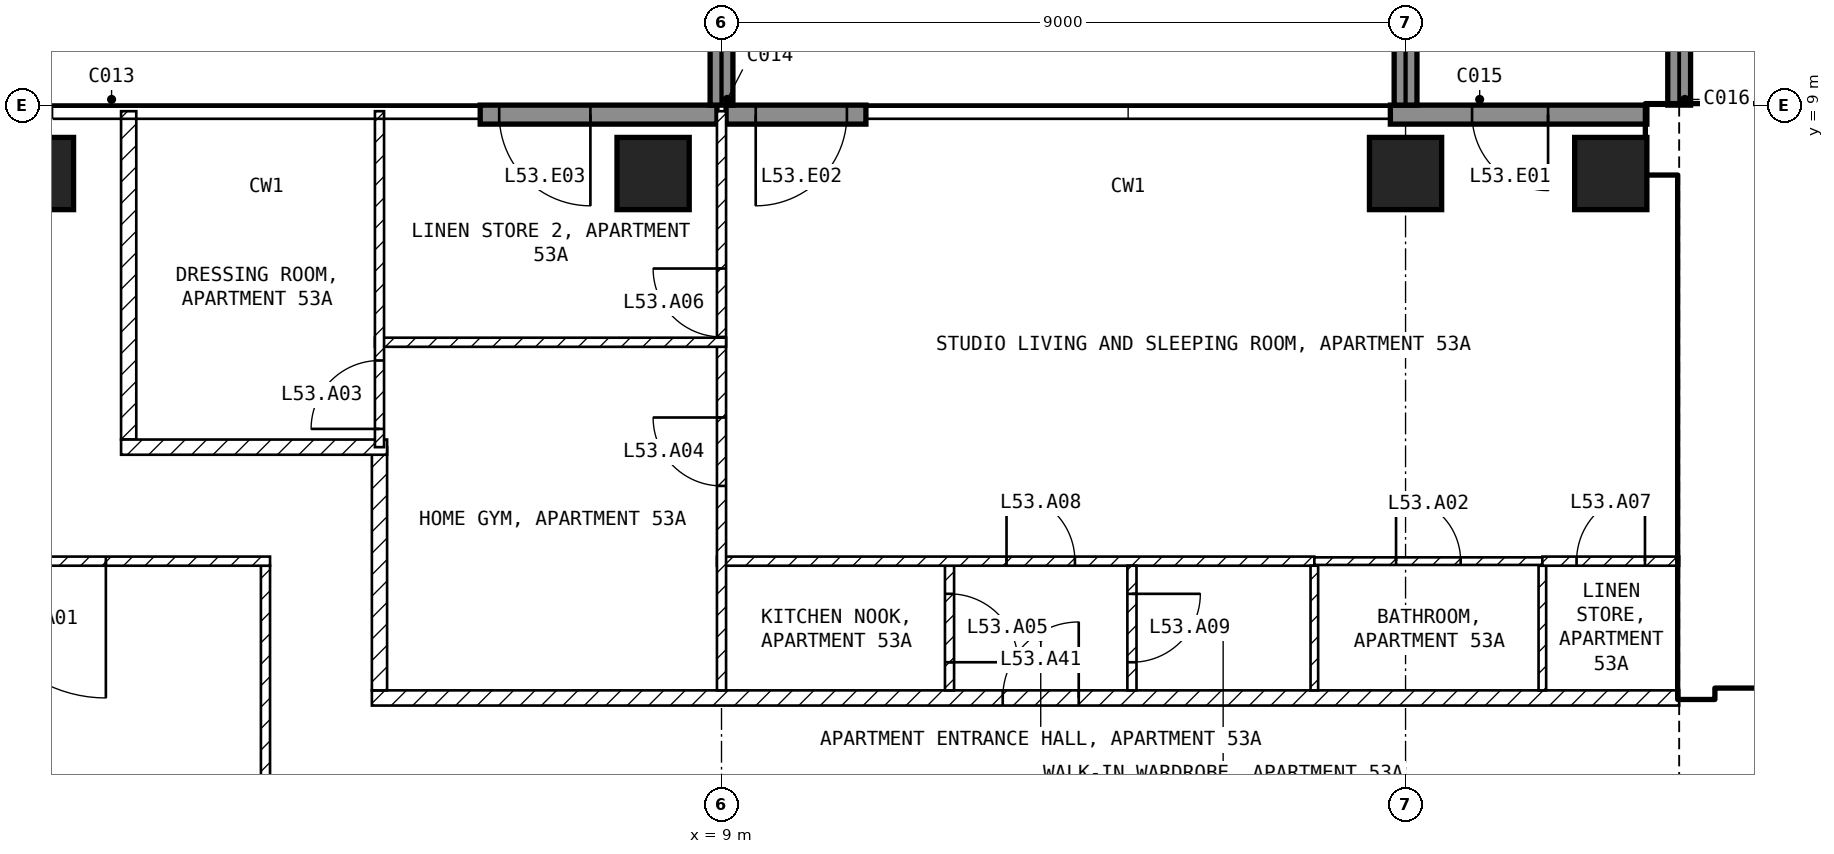
"""IFC4 building model, lengths in metres.
Left out: names, types, materials, properties, quantities, classifications, styles, units other than length and angle.
Written with IfcOpenShell. Run it as: python <this file> out.ifc"""

import sys

from ifc_helpers import new_model, si_unit, direction, frame, frame_2d, origin, origin_2d, place, context, subcontext, project, spatial, rectangle, extrude, element, fill, save


model = new_model("IFC4")
c1 = context("Model", 3, precision=1e-05, world=origin(), true_north=direction((0.0, 1.0)))
c2 = subcontext(c1, "Body", "Model", "MODEL_VIEW")
j1 = project(units=[si_unit("LENGTHUNIT", "METRE"), si_unit("PLANEANGLEUNIT", "RADIAN")], contexts=[c1])
p1 = place(None, origin())
s1 = spatial("IfcSite", under=j1, at=p1, CompositionType="ELEMENT")
p2 = place(p1, origin())
s2 = spatial("IfcBuilding", under=s1, at=p2, CompositionType="ELEMENT")
p3 = place(p2, frame((0.0, 0.0, 212.1)))
s3 = spatial("IfcBuildingStorey", under=s2, at=p3, CompositionType="ELEMENT", Elevation=212.1)
for number, where, z_axis, x_axis in (
    (1, (0.0, 8.1, -0.25), (0.0, 0.0, 1.0), (1.0, 0.0, 0.0)),
    (2, (8.1, 8.1, -0.25), (0.0, 0.0, 1.0), (1.0, 0.0, 0.0)),
    (3, (18.0, 8.1, -0.25), (0.0, 0.0, 1.0), (1.0, 0.0, 0.0)),
    (4, (20.7, 8.1, -0.25), (0.0, 0.0, 1.0), (1.0, 0.0, 0.0)),
):
    element("IfcColumn", number, at=place(p3, frame(where, z_axis=z_axis, x_axis=x_axis)), inside=s3, PredefinedType="COLUMN", context=c2, shape_type="SweptSolid", body=[
        extrude(rectangle(XDim=0.95, YDim=0.95, at=origin_2d()), origin(), (0.0, 0.0, 1.0), 3.5),
    ])
p4 = place(p3, frame((21.175, 8.875, 0.0), z_axis=(0.0, 0.0, 1.0), x_axis=(-1.0, 0.0, 0.0)))
e5 = element("IfcWall", 5, at=p4, inside=s3, PredefinedType="SOLIDWALL", context=c2, shape_type="SweptSolid", body=[
    extrude(rectangle(XDim=3.375, YDim=0.25, at=frame_2d((1.688, 0.0))), origin(), (0.0, 0.0, 1.0), 3.25),
])
p5 = place(p4, frame((1.3, 0.0, 0.0)))
e6 = element("IfcOpeningElement", 6, at=p5, cuts=e5, PredefinedType="OPENING", context=c2, shape_type="SweptSolid", body=[
    extrude(rectangle(XDim=1.0, YDim=2.4, at=frame_2d((0.5, 1.2))), frame((0.0, 0.135, 0.0), z_axis=(0.0, -1.0, 0.0), x_axis=(1.0, 0.0, 0.0)), (0.0, 0.0, 1.0), 0.27),
])
p6 = place(p3, frame((10.9, 8.875, 0.0), z_axis=(0.0, 0.0, 1.0), x_axis=(-1.0, 0.0, 0.0)))
e7 = element("IfcWall", 7, at=p6, inside=s3, PredefinedType="SOLIDWALL", context=c2, shape_type="SweptSolid", body=[
    extrude(rectangle(XDim=1.84, YDim=0.25, at=frame_2d((0.92, 0.0))), origin(), (0.0, 0.0, 1.0), 3.25),
])
p7 = place(p6, frame((0.25, 0.0, 0.0)))
e8 = element("IfcOpeningElement", 8, at=p7, cuts=e7, PredefinedType="OPENING", context=c2, shape_type="SweptSolid", body=[
    extrude(rectangle(XDim=1.2, YDim=2.4, at=frame_2d((0.6, 1.2))), frame((0.0, 0.135, 0.0), z_axis=(0.0, -1.0, 0.0), x_axis=(1.0, 0.0, 0.0)), (0.0, 0.0, 1.0), 0.27),
])
p8 = place(p3, frame((8.94, 8.875, 0.0), z_axis=(0.0, 0.0, 1.0), x_axis=(-1.0, 0.0, 0.0)))
e9 = element("IfcWall", 9, at=p8, inside=s3, PredefinedType="SOLIDWALL", context=c2, shape_type="SweptSolid", body=[
    extrude(rectangle(XDim=3.115, YDim=0.25, at=frame_2d((1.558, 0.0))), origin(), (0.0, 0.0, 1.0), 3.25),
])
p9 = place(p8, frame((1.665, 0.0, 0.0)))
e10 = element("IfcOpeningElement", 10, at=p9, cuts=e9, PredefinedType="OPENING", context=c2, shape_type="SweptSolid", body=[
    extrude(rectangle(XDim=1.2, YDim=2.4, at=frame_2d((0.6, 1.2))), frame((0.0, 0.135, 0.0), z_axis=(0.0, -1.0, 0.0), x_axis=(1.0, 0.0, 0.0)), (0.0, 0.0, 1.0), 0.27),
])
for number, where, z_axis, x_axis in (
    (11, (9.0, 9.0, 0.0), (0.0, 0.0, 1.0), (0.0, 1.0, 0.0)),
    (12, (18.0, 9.0, 0.0), (0.0, 0.0, 1.0), (0.0, 1.0, 0.0)),
    (13, (21.6, 9.0, 0.0), (0.0, 0.0, 1.0), (0.0, 1.0, 0.0)),
):
    element("IfcWall", number, at=place(p3, frame(where, z_axis=z_axis, x_axis=x_axis)), inside=s3, PredefinedType="SOLIDWALL", context=c2, shape_type="SweptSolid", body=[
        extrude(rectangle(XDim=2.7, YDim=0.3, at=frame_2d((1.35, 0.0))), origin(), (0.0, 0.0, 1.0), 3.25),
    ])
p10 = place(p3, frame((21.175, 8.55, 0.0), z_axis=(0.0, 0.0, 1.0), x_axis=(1.0, 0.0, 0.0)))
e14 = element("IfcWall", 14, at=p10, inside=s3, PredefinedType="SHEAR", context=c2, shape_type="SweptSolid", body=[
    extrude(rectangle(XDim=8.425, YDim=0.9, at=frame_2d((4.212, 0.0))), origin(), (0.0, 0.0, 1.0), 3.25),
])
p11 = place(p3, frame((21.825, 1.2, 0.0), z_axis=(0.0, 0.0, 1.0), x_axis=(0.0, 1.0, 0.0)))
e15 = element("IfcWall", 15, at=p11, inside=s3, PredefinedType="SHEAR", context=c2, shape_type="SweptSolid", body=[
    extrude(rectangle(XDim=6.9, YDim=0.45, at=frame_2d((3.45, 0.0))), origin(), (0.0, 0.0, 1.0), 3.25),
])
p12 = place(p3, frame((22.05, 1.45, 0.0), z_axis=(0.0, 0.0, 1.0), x_axis=(1.0, 0.0, 0.0)))
e16 = element("IfcWall", 16, at=p12, inside=s3, PredefinedType="SOLIDWALL", context=c2, shape_type="SweptSolid", body=[
    extrude(rectangle(XDim=11.15, YDim=0.2, at=frame_2d((5.575, 0.0))), origin(), (0.0, 0.0, 1.0), 3.25),
])
p13 = place(p12, frame((0.75, 0.0, 0.0)))
e17 = element("IfcOpeningElement", 17, at=p13, cuts=e16, PredefinedType="OPENING", context=c2, shape_type="SweptSolid", body=[
    extrude(rectangle(XDim=1.0, YDim=2.1, at=frame_2d((0.5, 1.05))), frame((0.0, 0.11, 0.0), z_axis=(0.0, -1.0, 0.0), x_axis=(1.0, 0.0, 0.0)), (0.0, 0.0, 1.0), 0.22),
])
p14 = place(p12, frame((3.25, 0.0, 0.0)))
e18 = element("IfcOpeningElement", 18, at=p14, cuts=e16, PredefinedType="OPENING", context=c2, shape_type="SweptSolid", body=[
    extrude(rectangle(XDim=1.0, YDim=2.1, at=frame_2d((0.5, 1.05))), frame((0.0, 0.11, 0.0), z_axis=(0.0, -1.0, 0.0), x_axis=(1.0, 0.0, 0.0)), (0.0, 0.0, 1.0), 0.22),
])
p15 = place(p12, frame((9.15, 0.0, 0.0)))
e19 = element("IfcOpeningElement", 19, at=p15, cuts=e16, PredefinedType="OPENING", context=c2, shape_type="SweptSolid", body=[
    extrude(rectangle(XDim=0.9, YDim=2.1, at=frame_2d((0.45, 1.05))), frame((0.0, 0.11, 0.0), z_axis=(0.0, -1.0, 0.0), x_axis=(1.0, 0.0, 0.0)), (0.0, 0.0, 1.0), 0.22),
])
p16 = place(p3, frame((22.05, 5.15, 0.0), z_axis=(0.0, 0.0, 1.0), x_axis=(1.0, 0.0, 0.0)))
e20 = element("IfcWall", 20, at=p16, inside=s3, PredefinedType="SOLIDWALL", context=c2, shape_type="SweptSolid", body=[
    extrude(rectangle(XDim=6.3, YDim=0.2, at=frame_2d((3.15, 0.0))), origin(), (0.0, 0.0, 1.0), 3.25),
])
p17 = place(p16, frame((0.2, 0.0, 0.0)))
e21 = element("IfcOpeningElement", 21, at=p17, cuts=e20, PredefinedType="OPENING", context=c2, shape_type="SweptSolid", body=[
    extrude(rectangle(XDim=1.0, YDim=2.1, at=frame_2d((0.5, 1.05))), frame((0.0, 0.11, 0.0), z_axis=(0.0, -1.0, 0.0), x_axis=(1.0, 0.0, 0.0)), (0.0, 0.0, 1.0), 0.22),
])
p18 = place(p3, frame((3.0, -2.94, 0.0), z_axis=(0.0, 0.0, 1.0), x_axis=(0.0, 1.0, 0.0)))
e22 = element("IfcWall", 22, at=p18, inside=s3, PredefinedType="PARTITIONING", context=c2, shape_type="SweptSolid", body=[
    extrude(rectangle(XDim=5.88, YDim=0.12, at=frame_2d((2.94, 0.0))), origin(), (0.0, 0.0, 1.0), 3.25),
])
p19 = place(p3, frame((3.06, 3.0, 0.0), z_axis=(0.0, 0.0, 1.0), x_axis=(-1.0, 0.0, 0.0)))
e23 = element("IfcWall", 23, at=p19, inside=s3, PredefinedType="PARTITIONING", context=c2, shape_type="SweptSolid", body=[
    extrude(rectangle(XDim=6.12, YDim=0.12, at=frame_2d((3.06, 0.0))), origin(), (0.0, 0.0, 1.0), 3.25),
])
p20 = place(p19, frame((2.16, 0.0, 0.0)))
e24 = element("IfcOpeningElement", 24, at=p20, cuts=e23, PredefinedType="OPENING", context=c2, shape_type="SweptSolid", body=[
    extrude(rectangle(XDim=1.8, YDim=2.1, at=frame_2d((0.9, 1.05))), frame((0.0, 0.07, 0.0), z_axis=(0.0, -1.0, 0.0), x_axis=(1.0, 0.0, 0.0)), (0.0, 0.0, 1.0), 0.14),
])
p21 = place(p3, frame((4.4, 1.2, 0.0), z_axis=(0.0, 0.0, 1.0), x_axis=(1.0, 0.0, 0.0)))
e25 = element("IfcWall", 25, at=p21, inside=s3, PredefinedType="PARTITIONING", context=c2, shape_type="SweptSolid", body=[
    extrude(rectangle(XDim=17.2, YDim=0.2, at=frame_2d((8.6, 0.0))), origin(), (0.0, 0.0, 1.0), 3.25),
])
p22 = place(p21, frame((8.3, 0.0, 0.0)))
e26 = element("IfcOpeningElement", 26, at=p22, cuts=e25, PredefinedType="OPENING", context=c2, shape_type="SweptSolid", body=[
    extrude(rectangle(XDim=1.0, YDim=2.1, at=frame_2d((0.5, 1.05))), frame((0.0, 0.11, 0.0), z_axis=(0.0, -1.0, 0.0), x_axis=(1.0, 0.0, 0.0)), (0.0, 0.0, 1.0), 0.22),
])
p23 = place(p3, frame((4.5, 4.5, 0.0), z_axis=(0.0, 0.0, 1.0), x_axis=(0.0, -1.0, 0.0)))
e27 = element("IfcWall", 27, at=p23, inside=s3, PredefinedType="PARTITIONING", context=c2, shape_type="SweptSolid", body=[
    extrude(rectangle(XDim=3.2, YDim=0.2, at=frame_2d((1.6, 0.0))), origin(), (0.0, 0.0, 1.0), 3.25),
])
p24 = place(p3, frame((1.2, 8.92, 0.0), z_axis=(0.0, 0.0, 1.0), x_axis=(0.0, -1.0, 0.0)))
e28 = element("IfcWall", 28, at=p24, inside=s3, PredefinedType="PARTITIONING", context=c2, shape_type="SweptSolid", body=[
    extrude(rectangle(XDim=4.32, YDim=0.2, at=frame_2d((2.16, 0.0))), origin(), (0.0, 0.0, 1.0), 3.25),
])
p25 = place(p3, frame((1.1, 4.5, 0.0), z_axis=(0.0, 0.0, 1.0), x_axis=(1.0, 0.0, 0.0)))
e29 = element("IfcWall", 29, at=p25, inside=s3, PredefinedType="PARTITIONING", context=c2, shape_type="SweptSolid", body=[
    extrude(rectangle(XDim=3.5, YDim=0.2, at=frame_2d((1.75, 0.0))), origin(), (0.0, 0.0, 1.0), 3.25),
])
p26 = place(p3, frame((12.0, 2.94, 0.0), z_axis=(0.0, 0.0, 1.0), x_axis=(0.0, -1.0, 0.0)))
e30 = element("IfcWall", 30, at=p26, inside=s3, PredefinedType="PARTITIONING", context=c2, shape_type="SweptSolid", body=[
    extrude(rectangle(XDim=1.64, YDim=0.12, at=frame_2d((0.82, 0.0))), origin(), (0.0, 0.0, 1.0), 3.25),
])
p27 = place(p26, frame((0.37, 0.0, 0.0)))
e31 = element("IfcOpeningElement", 31, at=p27, cuts=e30, PredefinedType="OPENING", context=c2, shape_type="SweptSolid", body=[
    extrude(rectangle(XDim=0.9, YDim=2.1, at=frame_2d((0.45, 1.05))), frame((0.0, 0.07, 0.0), z_axis=(0.0, -1.0, 0.0), x_axis=(1.0, 0.0, 0.0)), (0.0, 0.0, 1.0), 0.14),
])
p28 = place(p3, frame((8.94, 3.0, 0.0), z_axis=(0.0, 0.0, 1.0), x_axis=(1.0, 0.0, 0.0)))
e32 = element("IfcWall", 32, at=p28, inside=s3, PredefinedType="PARTITIONING", context=c2, shape_type="SweptSolid", body=[
    extrude(rectangle(XDim=7.86, YDim=0.12, at=frame_2d((3.93, 0.0))), origin(), (0.0, 0.0, 1.0), 3.25),
])
p29 = place(p28, frame((3.81, 0.0, 0.0)))
e33 = element("IfcOpeningElement", 33, at=p29, cuts=e32, PredefinedType="OPENING", context=c2, shape_type="SweptSolid", body=[
    extrude(rectangle(XDim=0.9, YDim=2.1, at=frame_2d((0.45, 1.05))), frame((0.0, 0.07, 0.0), z_axis=(0.0, -1.0, 0.0), x_axis=(1.0, 0.0, 0.0)), (0.0, 0.0, 1.0), 0.14),
])
p30 = place(p3, frame((9.0, 1.3, 0.0), z_axis=(0.0, 0.0, 1.0), x_axis=(0.0, 1.0, 0.0)))
e34 = element("IfcWall", 34, at=p30, inside=s3, PredefinedType="PARTITIONING", context=c2, shape_type="SweptSolid", body=[
    extrude(rectangle(XDim=7.62, YDim=0.12, at=frame_2d((3.81, 0.0))), origin(), (0.0, 0.0, 1.0), 3.25),
])
p31 = place(p30, frame((2.69, 0.0, 0.0)))
e35 = element("IfcOpeningElement", 35, at=p31, cuts=e34, PredefinedType="OPENING", context=c2, shape_type="SweptSolid", body=[
    extrude(rectangle(XDim=0.9, YDim=2.1, at=frame_2d((0.45, 1.05))), frame((0.0, 0.07, 0.0), z_axis=(0.0, -1.0, 0.0), x_axis=(1.0, 0.0, 0.0)), (0.0, 0.0, 1.0), 0.14),
])
p32 = place(p30, frame((4.65, 0.0, 0.0)))
e36 = element("IfcOpeningElement", 36, at=p32, cuts=e34, PredefinedType="OPENING", context=c2, shape_type="SweptSolid", body=[
    extrude(rectangle(XDim=0.9, YDim=2.1, at=frame_2d((0.45, 1.05))), frame((0.0, 0.07, 0.0), z_axis=(0.0, -1.0, 0.0), x_axis=(1.0, 0.0, 0.0)), (0.0, 0.0, 1.0), 0.14),
])
p33 = place(p3, frame((14.4, 2.94, 0.0), z_axis=(0.0, 0.0, 1.0), x_axis=(0.0, -1.0, 0.0)))
e37 = element("IfcWall", 37, at=p33, inside=s3, PredefinedType="PARTITIONING", context=c2, shape_type="SweptSolid", body=[
    extrude(rectangle(XDim=1.64, YDim=0.12, at=frame_2d((0.82, 0.0))), origin(), (0.0, 0.0, 1.0), 3.25),
])
p34 = place(p33, frame((0.37, 0.0, 0.0)))
e38 = element("IfcOpeningElement", 38, at=p34, cuts=e37, PredefinedType="OPENING", context=c2, shape_type="SweptSolid", body=[
    extrude(rectangle(XDim=0.9, YDim=2.1, at=frame_2d((0.45, 1.05))), frame((0.0, 0.07, 0.0), z_axis=(0.0, -1.0, 0.0), x_axis=(1.0, 0.0, 0.0)), (0.0, 0.0, 1.0), 0.14),
])
for number, where, z_axis, x_axis in (
    (39, (16.8, 2.94, 0.0), (0.0, 0.0, 1.0), (0.0, -1.0, 0.0)),
    (40, (19.8, 2.94, 0.0), (0.0, 0.0, 1.0), (0.0, -1.0, 0.0)),
):
    element("IfcWall", number, at=place(p3, frame(where, z_axis=z_axis, x_axis=x_axis)), inside=s3, PredefinedType="PARTITIONING", context=c2, shape_type="SweptSolid", body=[
        extrude(rectangle(XDim=1.64, YDim=0.1, at=frame_2d((0.82, 0.0))), origin(), (0.0, 0.0, 1.0), 3.25),
    ])
p35 = place(p3, frame((16.8, 3.0, 0.0), z_axis=(0.0, 0.0, 1.0), x_axis=(1.0, 0.0, 0.0)))
e41 = element("IfcWall", 41, at=p35, inside=s3, PredefinedType="PARTITIONING", context=c2, shape_type="SweptSolid", body=[
    extrude(rectangle(XDim=3.0, YDim=0.1, at=frame_2d((1.5, 0.0))), origin(), (0.0, 0.0, 1.0), 3.25),
])
p36 = place(p35, frame((1.075, 0.0, 0.0)))
e42 = element("IfcOpeningElement", 42, at=p36, cuts=e41, PredefinedType="OPENING", context=c2, shape_type="SweptSolid", body=[
    extrude(rectangle(XDim=0.85, YDim=2.1, at=frame_2d((0.425, 1.05))), frame((0.0, 0.06, 0.0), z_axis=(0.0, -1.0, 0.0), x_axis=(1.0, 0.0, 0.0)), (0.0, 0.0, 1.0), 0.12),
])
p37 = place(p3, frame((19.8, 3.0, 0.0), z_axis=(0.0, 0.0, 1.0), x_axis=(1.0, 0.0, 0.0)))
e43 = element("IfcWall", 43, at=p37, inside=s3, PredefinedType="PARTITIONING", context=c2, shape_type="SweptSolid", body=[
    extrude(rectangle(XDim=1.8, YDim=0.12, at=frame_2d((0.9, 0.0))), origin(), (0.0, 0.0, 1.0), 3.25),
])
p38 = place(p37, frame((0.45, 0.0, 0.0)))
e44 = element("IfcOpeningElement", 44, at=p38, cuts=e43, PredefinedType="OPENING", context=c2, shape_type="SweptSolid", body=[
    extrude(rectangle(XDim=0.9, YDim=2.1, at=frame_2d((0.45, 1.05))), frame((0.0, 0.07, 0.0), z_axis=(0.0, -1.0, 0.0), x_axis=(1.0, 0.0, 0.0)), (0.0, 0.0, 1.0), 0.14),
])
p39 = place(p3, frame((4.44, 5.88, 0.0), z_axis=(0.0, 0.0, 1.0), x_axis=(1.0, 0.0, 0.0)))
e45 = element("IfcWall", 45, at=p39, inside=s3, PredefinedType="PARTITIONING", context=c2, shape_type="SweptSolid", body=[
    extrude(rectangle(XDim=4.62, YDim=0.12, at=frame_2d((2.31, 0.0))), origin(), (0.0, 0.0, 1.0), 3.25),
])
p40 = place(p3, frame((4.5, 4.5, 0.0), z_axis=(0.0, 0.0, 1.0), x_axis=(0.0, 1.0, 0.0)))
e46 = element("IfcWall", 46, at=p40, inside=s3, PredefinedType="PARTITIONING", context=c2, shape_type="SweptSolid", body=[
    extrude(rectangle(XDim=4.42, YDim=0.12, at=frame_2d((2.21, 0.0))), origin(), (0.0, 0.0, 1.0), 3.25),
])
p41 = place(p40, frame((0.24, 0.0, 0.0)))
e47 = element("IfcOpeningElement", 47, at=p41, cuts=e46, PredefinedType="OPENING", context=c2, shape_type="SweptSolid", body=[
    extrude(rectangle(XDim=0.9, YDim=2.1, at=frame_2d((0.45, 1.05))), frame((0.0, 0.07, 0.0), z_axis=(0.0, -1.0, 0.0), x_axis=(1.0, 0.0, 0.0)), (0.0, 0.0, 1.0), 0.14),
])
p42 = place(p5, origin())
e48 = element("IfcDoor", 48, at=p42, inside=s3, OperationType="SINGLE_SWING_LEFT", PredefinedType="DOOR", context=c2, shape_type="SweptSolid", body=[
    extrude(rectangle(XDim=1.0, YDim=2.4, at=frame_2d((0.5, 1.2))), frame((0.0, 0.025, 0.0), z_axis=(0.0, -1.0, 0.0), x_axis=(1.0, 0.0, 0.0)), (0.0, 0.0, 1.0), 0.05),
])
fill(e6, e48)
p43 = place(p7, origin())
e49 = element("IfcDoor", 49, at=p43, inside=s3, OperationType="SINGLE_SWING_RIGHT", PredefinedType="DOOR", context=c2, shape_type="SweptSolid", body=[
    extrude(rectangle(XDim=1.2, YDim=2.4, at=frame_2d((0.6, 1.2))), frame((0.0, 0.025, 0.0), z_axis=(0.0, -1.0, 0.0), x_axis=(1.0, 0.0, 0.0)), (0.0, 0.0, 1.0), 0.05),
])
fill(e8, e49)
p44 = place(p9, origin())
e50 = element("IfcDoor", 50, at=p44, inside=s3, OperationType="SINGLE_SWING_LEFT", PredefinedType="DOOR", context=c2, shape_type="SweptSolid", body=[
    extrude(rectangle(XDim=1.2, YDim=2.4, at=frame_2d((0.6, 1.2))), frame((0.0, 0.025, 0.0), z_axis=(0.0, -1.0, 0.0), x_axis=(1.0, 0.0, 0.0)), (0.0, 0.0, 1.0), 0.05),
])
fill(e10, e50)
p45 = place(p17, origin())
e51 = element("IfcDoor", 51, at=p45, inside=s3, OperationType="SINGLE_SWING_LEFT", PredefinedType="DOOR", context=c2, shape_type="SweptSolid", body=[
    extrude(rectangle(XDim=1.0, YDim=2.1, at=frame_2d((0.5, 1.05))), frame((0.0, 0.025, 0.0), z_axis=(0.0, -1.0, 0.0), x_axis=(1.0, 0.0, 0.0)), (0.0, 0.0, 1.0), 0.05),
])
fill(e21, e51)
p46 = place(p20, origin())
e52 = element("IfcDoor", 52, at=p46, inside=s3, OperationType="SINGLE_SWING_LEFT", PredefinedType="DOOR", context=c2, shape_type="SweptSolid", body=[
    extrude(rectangle(XDim=1.8, YDim=2.1, at=frame_2d((0.9, 1.05))), frame((0.0, 0.025, 0.0), z_axis=(0.0, -1.0, 0.0), x_axis=(1.0, 0.0, 0.0)), (0.0, 0.0, 1.0), 0.05),
])
fill(e24, e52)
p47 = place(p36, origin())
e53 = element("IfcDoor", 53, at=p47, inside=s3, OperationType="SINGLE_SWING_LEFT", PredefinedType="DOOR", context=c2, shape_type="SweptSolid", body=[
    extrude(rectangle(XDim=0.85, YDim=2.1, at=frame_2d((0.425, 1.05))), frame((0.0, 0.025, 0.0), z_axis=(0.0, -1.0, 0.0), x_axis=(1.0, 0.0, 0.0)), (0.0, 0.0, 1.0), 0.05),
])
fill(e42, e53)
p48 = place(p41, origin())
e54 = element("IfcDoor", 54, at=p48, inside=s3, OperationType="SINGLE_SWING_LEFT", PredefinedType="DOOR", context=c2, shape_type="SweptSolid", body=[
    extrude(rectangle(XDim=0.9, YDim=2.1, at=frame_2d((0.45, 1.05))), frame((0.0, 0.025, 0.0), z_axis=(0.0, -1.0, 0.0), x_axis=(1.0, 0.0, 0.0)), (0.0, 0.0, 1.0), 0.05),
])
fill(e47, e54)
p49 = place(p31, origin())
e55 = element("IfcDoor", 55, at=p49, inside=s3, OperationType="SINGLE_SWING_RIGHT", PredefinedType="DOOR", context=c2, shape_type="SweptSolid", body=[
    extrude(rectangle(XDim=0.9, YDim=2.1, at=frame_2d((0.45, 1.05))), frame((0.0, 0.025, 0.0), z_axis=(0.0, -1.0, 0.0), x_axis=(1.0, 0.0, 0.0)), (0.0, 0.0, 1.0), 0.05),
])
fill(e35, e55)
p50 = place(p27, origin())
e56 = element("IfcDoor", 56, at=p50, inside=s3, OperationType="SINGLE_SWING_RIGHT", PredefinedType="DOOR", context=c2, shape_type="SweptSolid", body=[
    extrude(rectangle(XDim=0.9, YDim=2.1, at=frame_2d((0.45, 1.05))), frame((0.0, 0.025, 0.0), z_axis=(0.0, -1.0, 0.0), x_axis=(1.0, 0.0, 0.0)), (0.0, 0.0, 1.0), 0.05),
])
fill(e31, e56)
p51 = place(p32, origin())
e57 = element("IfcDoor", 57, at=p51, inside=s3, OperationType="SINGLE_SWING_RIGHT", PredefinedType="DOOR", context=c2, shape_type="SweptSolid", body=[
    extrude(rectangle(XDim=0.9, YDim=2.1, at=frame_2d((0.45, 1.05))), frame((0.0, 0.025, 0.0), z_axis=(0.0, -1.0, 0.0), x_axis=(1.0, 0.0, 0.0)), (0.0, 0.0, 1.0), 0.05),
])
fill(e36, e57)
p52 = place(p38, origin())
e58 = element("IfcDoor", 58, at=p52, inside=s3, OperationType="SINGLE_SWING_RIGHT", PredefinedType="DOOR", context=c2, shape_type="SweptSolid", body=[
    extrude(rectangle(XDim=0.9, YDim=2.1, at=frame_2d((0.45, 1.05))), frame((0.0, 0.025, 0.0), z_axis=(0.0, -1.0, 0.0), x_axis=(1.0, 0.0, 0.0)), (0.0, 0.0, 1.0), 0.05),
])
fill(e44, e58)
p53 = place(p29, origin())
e59 = element("IfcDoor", 59, at=p53, inside=s3, OperationType="SINGLE_SWING_LEFT", PredefinedType="DOOR", context=c2, shape_type="SweptSolid", body=[
    extrude(rectangle(XDim=0.9, YDim=2.1, at=frame_2d((0.45, 1.05))), frame((0.0, 0.025, 0.0), z_axis=(0.0, -1.0, 0.0), x_axis=(1.0, 0.0, 0.0)), (0.0, 0.0, 1.0), 0.05),
])
fill(e33, e59)
p54 = place(p34, origin())
e60 = element("IfcDoor", 60, at=p54, inside=s3, OperationType="SINGLE_SWING_LEFT", PredefinedType="DOOR", context=c2, shape_type="SweptSolid", body=[
    extrude(rectangle(XDim=0.9, YDim=2.1, at=frame_2d((0.45, 1.05))), frame((0.0, 0.025, 0.0), z_axis=(0.0, -1.0, 0.0), x_axis=(1.0, 0.0, 0.0)), (0.0, 0.0, 1.0), 0.05),
])
fill(e38, e60)
p55 = place(p22, origin())
e61 = element("IfcDoor", 61, at=p55, inside=s3, OperationType="SINGLE_SWING_RIGHT", PredefinedType="DOOR", context=c2, shape_type="SweptSolid", body=[
    extrude(rectangle(XDim=1.0, YDim=2.1, at=frame_2d((0.5, 1.05))), frame((0.0, 0.025, 0.0), z_axis=(0.0, -1.0, 0.0), x_axis=(1.0, 0.0, 0.0)), (0.0, 0.0, 1.0), 0.05),
])
fill(e26, e61)
save(model, sys.argv[1])
